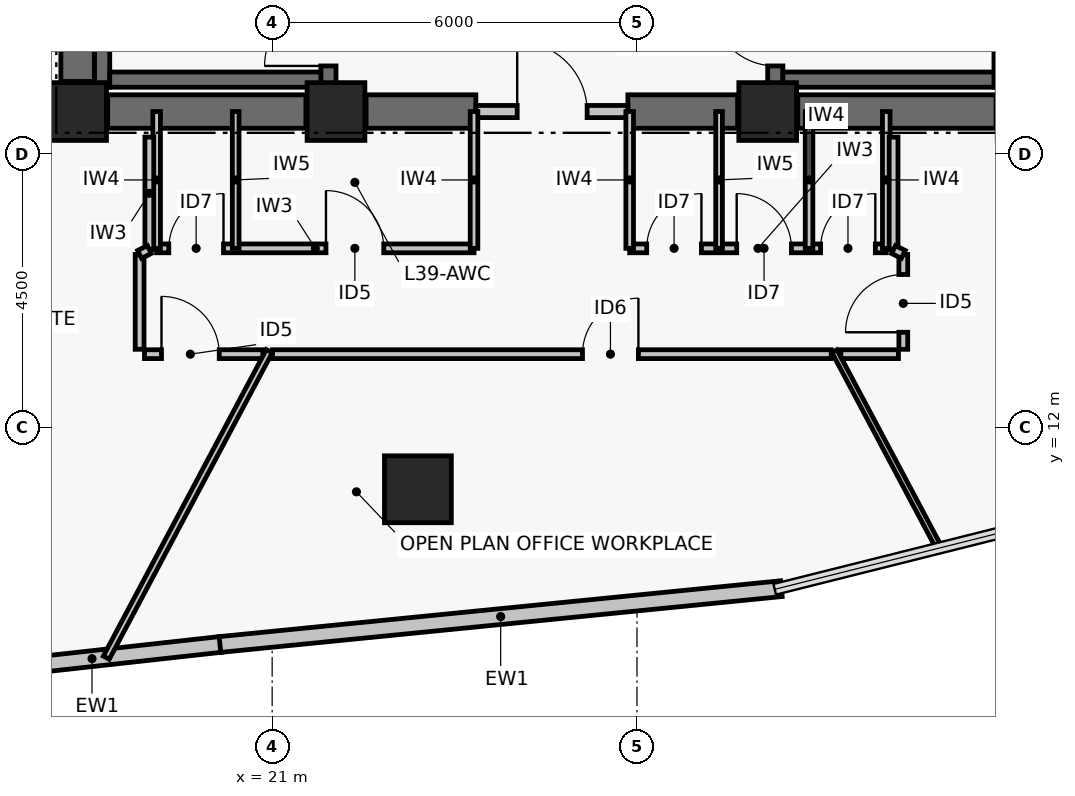
"""IFC4 building model, lengths in metres.
Left out: names, types, materials, properties, quantities, classifications, styles, units other than length and angle.
Written with IfcOpenShell. Run it as: python <this file> out.ifc"""

import sys

from ifc_helpers import new_model, si_unit, direction, frame, frame_2d, origin, origin_2d, place, context, subcontext, project, spatial, rectangle, hollow_rectangle, extrude, element, fill, save


model = new_model("IFC4")
c1 = context("Model", 3, precision=1e-05, world=origin(), true_north=direction((0.0, 1.0)))
c2 = subcontext(c1, "Body", "Model", "MODEL_VIEW")
j1 = project(units=[si_unit("LENGTHUNIT", "METRE"), si_unit("PLANEANGLEUNIT", "RADIAN")], contexts=[c1])
p1 = place(None, origin())
s1 = spatial("IfcSite", under=j1, at=p1, CompositionType="ELEMENT")
p2 = place(p1, origin())
s2 = spatial("IfcBuilding", under=s1, at=p2, CompositionType="ELEMENT")
p3 = place(p2, frame((0.0, 0.0, 158.04)))
s3 = spatial("IfcBuildingStorey", under=s2, at=p3, CompositionType="ELEMENT", Elevation=158.04)
for number, where, z_axis, x_axis in (
    (1, (17.8, 17.2, 0.0), (0.0, 0.0, 1.0), (1.0, 0.0, 0.0)),
    (2, (22.05, 17.2, 0.0), (0.0, 0.0, 1.0), (1.0, 0.0, 0.0)),
    (3, (29.15, 17.2, 0.0), (0.0, 0.0, 1.0), (1.0, 0.0, 0.0)),
):
    element("IfcColumn", number, at=place(p3, frame(where, z_axis=z_axis, x_axis=x_axis)), inside=s3, PredefinedType="COLUMN", context=c2, shape_type="SweptSolid", body=[
        extrude(rectangle(XDim=0.95, YDim=0.95, at=origin_2d()), origin(), (0.0, 0.0, 1.0), 3.72),
    ])
p4 = place(p3, frame((18.295, 17.2, 0.0), z_axis=(0.0, 0.0, 1.0), x_axis=(1.0, 0.0, 0.0)))
e4 = element("IfcWall", 4, at=p4, inside=s3, PredefinedType="SHEAR", context=c2, shape_type="SweptSolid", body=[
    extrude(rectangle(XDim=3.26, YDim=0.55, at=frame_2d((1.63, 0.0))), origin(), (0.0, 0.0, 1.0), 3.5),
])
p5 = place(p3, frame((22.545, 17.2, 0.0), z_axis=(0.0, 0.0, 1.0), x_axis=(1.0, 0.0, 0.0)))
e5 = element("IfcWall", 5, at=p5, inside=s3, PredefinedType="SHEAR", context=c2, shape_type="SweptSolid", body=[
    extrude(rectangle(XDim=1.805, YDim=0.55, at=frame_2d((0.903, 0.0))), origin(), (0.0, 0.0, 1.0), 3.5),
])
p6 = place(p3, frame((26.85, 17.2, 0.0), z_axis=(0.0, 0.0, 1.0), x_axis=(1.0, 0.0, 0.0)))
e6 = element("IfcWall", 6, at=p6, inside=s3, PredefinedType="SHEAR", context=c2, shape_type="SweptSolid", body=[
    extrude(rectangle(XDim=1.805, YDim=0.55, at=frame_2d((0.902, 0.0))), origin(), (0.0, 0.0, 1.0), 3.5),
])
p7 = place(p3, frame((29.645, 17.2, 0.0), z_axis=(0.0, 0.0, 1.0), x_axis=(1.0, 0.0, 0.0)))
e7 = element("IfcWall", 7, at=p7, inside=s3, PredefinedType="SHEAR", context=c2, shape_type="SweptSolid", body=[
    extrude(rectangle(XDim=3.26, YDim=0.55, at=frame_2d((1.63, 0.0))), origin(), (0.0, 0.0, 1.0), 3.5),
])
p8 = place(p3, frame((17.8, 17.695, 0.0), z_axis=(0.0, 0.0, 1.0), x_axis=(0.0, 1.0, 0.0)))
e8 = element("IfcWall", 8, at=p8, inside=s3, PredefinedType="SHEAR", context=c2, shape_type="SweptSolid", body=[
    extrude(rectangle(XDim=8.61, YDim=0.55, at=frame_2d((4.305, 0.0))), origin(), (0.0, 0.0, 1.0), 3.5),
])
p9 = place(p3, frame((18.204, 17.6, 0.0), z_axis=(0.0, 0.0, 1.0), x_axis=(0.0, 1.0, 0.0)))
e9 = element("IfcWall", 9, at=p9, inside=s3, PredefinedType="SHEAR", context=c2, shape_type="SweptSolid", body=[
    extrude(rectangle(XDim=8.8, YDim=0.25, at=frame_2d((4.4, 0.0))), origin(), (0.0, 0.0, 1.0), 3.5),
])
p10 = place(p3, frame((21.925, 17.6, 0.0), z_axis=(0.0, 0.0, 1.0), x_axis=(0.0, 1.0, 0.0)))
e10 = element("IfcWall", 10, at=p10, inside=s3, PredefinedType="SHEAR", context=c2, shape_type="SweptSolid", body=[
    extrude(rectangle(XDim=8.8, YDim=0.25, at=frame_2d((4.4, 0.0))), origin(), (0.0, 0.0, 1.0), 3.5),
])
p11 = place(p10, frame((0.35, 0.0, 0.0)))
e11 = element("IfcOpeningElement", 11, at=p11, cuts=e10, PredefinedType="OPENING", context=c2, shape_type="SweptSolid", body=[
    extrude(rectangle(XDim=1.05, YDim=2.08, at=frame_2d((0.525, 1.04))), frame((0.0, 0.135, 0.0), z_axis=(0.0, -1.0, 0.0), x_axis=(1.0, 0.0, 0.0)), (0.0, 0.0, 1.0), 0.27),
])
p12 = place(p3, frame((18.329, 17.725, 0.0), z_axis=(0.0, 0.0, 1.0), x_axis=(1.0, 0.0, 0.0)))
e12 = element("IfcWall", 12, at=p12, inside=s3, PredefinedType="SHEAR", context=c2, shape_type="SweptSolid", body=[
    extrude(rectangle(XDim=3.471, YDim=0.25, at=frame_2d((1.735, 0.0))), origin(), (0.0, 0.0, 1.0), 3.5),
])
p13 = place(p3, frame((29.275, 17.6, 0.0), z_axis=(0.0, 0.0, 1.0), x_axis=(0.0, 1.0, 0.0)))
e13 = element("IfcWall", 13, at=p13, inside=s3, PredefinedType="SHEAR", context=c2, shape_type="SweptSolid", body=[
    extrude(rectangle(XDim=8.8, YDim=0.25, at=frame_2d((4.4, 0.0))), origin(), (0.0, 0.0, 1.0), 3.5),
])
p14 = place(p13, frame((0.35, 0.0, 0.0)))
e14 = element("IfcOpeningElement", 14, at=p14, cuts=e13, PredefinedType="OPENING", context=c2, shape_type="SweptSolid", body=[
    extrude(rectangle(XDim=1.05, YDim=2.08, at=frame_2d((0.525, 1.04))), frame((0.0, 0.135, 0.0), z_axis=(0.0, -1.0, 0.0), x_axis=(1.0, 0.0, 0.0)), (0.0, 0.0, 1.0), 0.27),
])
p15 = place(p3, frame((32.996, 17.6, 0.0), z_axis=(0.0, 0.0, 1.0), x_axis=(0.0, 1.0, 0.0)))
e15 = element("IfcWall", 15, at=p15, inside=s3, PredefinedType="SHEAR", context=c2, shape_type="SweptSolid", body=[
    extrude(rectangle(XDim=8.8, YDim=0.25, at=frame_2d((4.4, 0.0))), origin(), (0.0, 0.0, 1.0), 3.5),
])
p16 = place(p3, frame((29.4, 17.725, 0.0), z_axis=(0.0, 0.0, 1.0), x_axis=(1.0, 0.0, 0.0)))
e16 = element("IfcWall", 16, at=p16, inside=s3, PredefinedType="SHEAR", context=c2, shape_type="SweptSolid", body=[
    extrude(rectangle(XDim=3.471, YDim=0.25, at=frame_2d((1.736, 0.0))), origin(), (0.0, 0.0, 1.0), 3.5),
])
p17 = place(p3, frame((23.397, 10.988, 0.0), z_axis=(0.0, 0.0, 1.0), x_axis=(1.0, 0.0, 0.0)))
e17 = element("IfcColumn", 17, at=p17, inside=s3, PredefinedType="COLUMN", context=c2, shape_type="SweptSolid", body=[
    extrude(hollow_rectangle(XDim=1.1, YDim=1.1, WallThickness=0.045, at=origin_2d()), origin(), (0.0, 0.0, 1.0), 3.72),
])
p18 = place(p3, frame((20.153, 8.437, 0.0), z_axis=(0.0, 0.0, 1.0), x_axis=(-0.993933978819, -0.109978387641, 0.0)))
e18 = element("IfcWall", 18, at=p18, inside=s3, PredefinedType="PARTITIONING", context=c2, shape_type="SweptSolid", body=[
    extrude(rectangle(XDim=4.258, YDim=0.26, at=frame_2d((2.129, 0.0))), origin(), (0.0, 0.0, 1.0), 3.5),
])
p19 = place(p3, frame((29.375, 9.354, 0.0), z_axis=(0.0, 0.0, 1.0), x_axis=(-0.9950896707, -0.098977508888, 0.0)))
e19 = element("IfcWall", 19, at=p19, inside=s3, PredefinedType="PARTITIONING", context=c2, shape_type="SweptSolid", body=[
    extrude(rectangle(XDim=9.28, YDim=0.26, at=frame_2d((4.64, 0.0))), origin(), (0.0, 0.0, 1.0), 3.5),
])
p20 = place(p3, frame((24.35, 17.2, 0.0), z_axis=(0.0, 0.0, 1.0), x_axis=(1.0, 0.0, 0.0)))
e20 = element("IfcWall", 20, at=p20, inside=s3, PredefinedType="PARTITIONING", context=c2, shape_type="SweptSolid", body=[
    extrude(rectangle(XDim=2.5, YDim=0.2, at=frame_2d((1.25, 0.0))), origin(), (0.0, 0.0, 1.0), 2.63),
])
p21 = place(p20, frame((0.68, 0.0, 0.0)))
e21 = element("IfcOpeningElement", 21, at=p21, cuts=e20, PredefinedType="OPENING", context=c2, shape_type="SweptSolid", body=[
    extrude(rectangle(XDim=1.15, YDim=2.08, at=frame_2d((0.575, 1.04))), frame((0.0, 0.11, 0.0), z_axis=(0.0, -1.0, 0.0), x_axis=(1.0, 0.0, 0.0)), (0.0, 0.0, 1.0), 0.22),
])
p22 = place(p3, frame((19.1, 14.95, 0.0), z_axis=(0.0, 0.0, 1.0), x_axis=(1.0, 0.0, 0.0)))
e22 = element("IfcWall", 22, at=p22, inside=s3, PredefinedType="PARTITIONING", context=c2, shape_type="SweptSolid", body=[
    extrude(rectangle(XDim=5.22, YDim=0.145, at=frame_2d((2.61, 0.0))), origin(), (0.0, 0.0, 1.0), 2.73),
])
p23 = place(p22, frame((0.2, 0.0, 0.0)))
e23 = element("IfcOpeningElement", 23, at=p23, cuts=e22, PredefinedType="OPENING", context=c2, shape_type="SweptSolid", body=[
    extrude(rectangle(XDim=0.9, YDim=2.02, at=frame_2d((0.45, 1.01))), frame((0.0, 0.083, 0.0), z_axis=(0.0, -1.0, 0.0), x_axis=(1.0, 0.0, 0.0)), (0.0, 0.0, 1.0), 0.165),
])
p24 = place(p22, frame((2.785, 0.0, 0.0)))
e24 = element("IfcOpeningElement", 24, at=p24, cuts=e22, PredefinedType="OPENING", context=c2, shape_type="SweptSolid", body=[
    extrude(rectangle(XDim=0.95, YDim=2.06, at=frame_2d((0.475, 1.03))), frame((0.0, 0.083, 0.0), z_axis=(0.0, -1.0, 0.0), x_axis=(1.0, 0.0, 0.0)), (0.0, 0.0, 1.0), 0.165),
])
p25 = place(p3, frame((26.88, 14.95, 0.0), z_axis=(0.0, 0.0, 1.0), x_axis=(1.0, 0.0, 0.0)))
e25 = element("IfcWall", 25, at=p25, inside=s3, PredefinedType="PARTITIONING", context=c2, shape_type="SweptSolid", body=[
    extrude(rectangle(XDim=4.22, YDim=0.145, at=frame_2d((2.11, 0.0))), origin(), (0.0, 0.0, 1.0), 2.93),
])
p26 = place(p25, frame((0.28, 0.0, 0.0)))
e26 = element("IfcOpeningElement", 26, at=p26, cuts=e25, PredefinedType="OPENING", context=c2, shape_type="SweptSolid", body=[
    extrude(rectangle(XDim=0.9, YDim=2.02, at=frame_2d((0.45, 1.01))), frame((0.0, 0.083, 0.0), z_axis=(0.0, -1.0, 0.0), x_axis=(1.0, 0.0, 0.0)), (0.0, 0.0, 1.0), 0.165),
])
p27 = place(p25, frame((1.76, 0.0, 0.0)))
e27 = element("IfcOpeningElement", 27, at=p27, cuts=e25, PredefinedType="OPENING", context=c2, shape_type="SweptSolid", body=[
    extrude(rectangle(XDim=0.9, YDim=2.02, at=frame_2d((0.45, 1.01))), frame((0.0, 0.083, 0.0), z_axis=(0.0, -1.0, 0.0), x_axis=(1.0, 0.0, 0.0)), (0.0, 0.0, 1.0), 0.165),
])
p28 = place(p25, frame((3.14, 0.0, 0.0)))
e28 = element("IfcOpeningElement", 28, at=p28, cuts=e25, PredefinedType="OPENING", context=c2, shape_type="SweptSolid", body=[
    extrude(rectangle(XDim=0.9, YDim=2.02, at=frame_2d((0.45, 1.01))), frame((0.0, 0.083, 0.0), z_axis=(0.0, -1.0, 0.0), x_axis=(1.0, 0.0, 0.0)), (0.0, 0.0, 1.0), 0.165),
])
p29 = place(p3, frame((19.1, 14.95, 0.0), z_axis=(0.0, 0.0, 1.0), x_axis=(0.0, 1.0, 0.0)))
e29 = element("IfcWall", 29, at=p29, inside=s3, PredefinedType="PARTITIONING", context=c2, shape_type="SweptSolid", body=[
    extrude(rectangle(XDim=2.25, YDim=0.125, at=frame_2d((1.125, 0.0))), origin(), (0.0, 0.0, 1.0), 2.63),
])
p30 = place(p3, frame((20.4, 14.95, 0.0), z_axis=(0.0, 0.0, 1.0), x_axis=(0.0, 1.0, 0.0)))
e30 = element("IfcWall", 30, at=p30, inside=s3, PredefinedType="PARTITIONING", context=c2, shape_type="SweptSolid", body=[
    extrude(rectangle(XDim=2.25, YDim=0.11, at=frame_2d((1.125, 0.0))), origin(), (0.0, 0.0, 1.0), 2.63),
])
for number, where, z_axis, x_axis in (
    (31, (24.32, 14.95, 0.0), (0.0, 0.0, 1.0), (0.0, 1.0, 0.0)),
    (32, (26.88, 14.95, 0.0), (0.0, 0.0, 1.0), (0.0, 1.0, 0.0)),
):
    element("IfcWall", number, at=place(p3, frame(where, z_axis=z_axis, x_axis=x_axis)), inside=s3, PredefinedType="PARTITIONING", context=c2, shape_type="SweptSolid", body=[
        extrude(rectangle(XDim=2.25, YDim=0.125, at=frame_2d((1.125, 0.0))), origin(), (0.0, 0.0, 1.0), 2.63),
    ])
p31 = place(p3, frame((28.35, 14.95, 0.0), z_axis=(0.0, 0.0, 1.0), x_axis=(0.0, 1.0, 0.0)))
e33 = element("IfcWall", 33, at=p31, inside=s3, PredefinedType="PARTITIONING", context=c2, shape_type="SweptSolid", body=[
    extrude(rectangle(XDim=2.25, YDim=0.11, at=frame_2d((1.125, 0.0))), origin(), (0.0, 0.0, 1.0), 2.63),
])
for number, where, z_axis, x_axis in (
    (34, (29.83, 14.95, 0.0), (0.0, 0.0, 1.0), (0.0, 1.0, 0.0)),
    (35, (31.1, 14.95, 0.0), (0.0, 0.0, 1.0), (0.0, 1.0, 0.0)),
):
    element("IfcWall", number, at=place(p3, frame(where, z_axis=z_axis, x_axis=x_axis)), inside=s3, PredefinedType="PARTITIONING", context=c2, shape_type="SweptSolid", body=[
        extrude(rectangle(XDim=2.25, YDim=0.125, at=frame_2d((1.125, 0.0))), origin(), (0.0, 0.0, 1.0), 2.63),
    ])
p32 = place(p3, frame((18.98, 16.78, 0.0), z_axis=(0.0, 0.0, 1.0), x_axis=(0.0, -1.0, 0.0)))
e36 = element("IfcWall", 36, at=p32, inside=s3, PredefinedType="PARTITIONING", context=c2, shape_type="SweptSolid", body=[
    extrude(rectangle(XDim=1.85, YDim=0.145, at=frame_2d((0.925, 0.0))), origin(), (0.0, 0.0, 1.0), 2.63),
])
p33 = place(p3, frame((18.82, 14.85, 0.0), z_axis=(0.0, 0.0, 1.0), x_axis=(0.0, -1.0, 0.0)))
e37 = element("IfcWall", 37, at=p33, inside=s3, PredefinedType="PARTITIONING", context=c2, shape_type="SweptSolid", body=[
    extrude(rectangle(XDim=1.56, YDim=0.145, at=frame_2d((0.78, 0.0))), origin(), (0.0, 0.0, 1.0), 3.08),
])
p34 = place(p3, frame((18.9, 13.21, 0.0), z_axis=(0.0, 0.0, 1.0), x_axis=(1.0, 0.0, 0.0)))
e38 = element("IfcWall", 38, at=p34, inside=s3, PredefinedType="PARTITIONING", context=c2, shape_type="SweptSolid", body=[
    extrude(rectangle(XDim=1.947, YDim=0.145, at=frame_2d((0.974, 0.0))), origin(), (0.0, 0.0, 1.0), 3.08),
])
p35 = place(p34, frame((0.28, 0.0, 0.0)))
e39 = element("IfcOpeningElement", 39, at=p35, cuts=e38, PredefinedType="OPENING", context=c2, shape_type="SweptSolid", body=[
    extrude(rectangle(XDim=0.95, YDim=2.06, at=frame_2d((0.475, 1.03))), frame((0.0, 0.083, 0.0), z_axis=(0.0, -1.0, 0.0), x_axis=(1.0, 0.0, 0.0)), (0.0, 0.0, 1.0), 0.165),
])
p36 = place(p3, frame((21.006, 13.21, 0.0), z_axis=(0.0, 0.0, 1.0), x_axis=(1.0, 0.0, 0.0)))
e40 = element("IfcWall", 40, at=p36, inside=s3, PredefinedType="PARTITIONING", context=c2, shape_type="SweptSolid", body=[
    extrude(rectangle(XDim=9.189, YDim=0.145, at=frame_2d((4.594, 0.0))), origin(), (0.0, 0.0, 1.0), 2.73),
])
p37 = place(p36, frame((5.098, 0.0, 0.0)))
e41 = element("IfcOpeningElement", 41, at=p37, cuts=e40, PredefinedType="OPENING", context=c2, shape_type="SweptSolid", body=[
    extrude(rectangle(XDim=0.92, YDim=2.05, at=frame_2d((0.46, 1.025))), frame((0.0, 0.083, 0.0), z_axis=(0.0, -1.0, 0.0), x_axis=(1.0, 0.0, 0.0)), (0.0, 0.0, 1.0), 0.165),
])
p38 = place(p3, frame((30.353, 13.21, 0.0), z_axis=(0.0, 0.0, 1.0), x_axis=(1.0, 0.0, 0.0)))
e42 = element("IfcWall", 42, at=p38, inside=s3, PredefinedType="PARTITIONING", context=c2, shape_type="SweptSolid", body=[
    extrude(rectangle(XDim=0.947, YDim=0.145, at=frame_2d((0.474, 0.0))), origin(), (0.0, 0.0, 1.0), 3.5),
])
p39 = place(p3, frame((31.38, 13.29, 0.0), z_axis=(0.0, 0.0, 1.0), x_axis=(0.0, 1.0, 0.0)))
e43 = element("IfcWall", 43, at=p39, inside=s3, PredefinedType="PARTITIONING", context=c2, shape_type="SweptSolid", body=[
    extrude(rectangle(XDim=1.56, YDim=0.145, at=frame_2d((0.78, 0.0))), origin(), (0.0, 0.0, 1.0), 3.5),
])
p40 = place(p39, frame((0.28, 0.0, 0.0)))
e44 = element("IfcOpeningElement", 44, at=p40, cuts=e43, PredefinedType="OPENING", context=c2, shape_type="SweptSolid", body=[
    extrude(rectangle(XDim=0.95, YDim=2.06, at=frame_2d((0.475, 1.03))), frame((0.0, 0.083, 0.0), z_axis=(0.0, -1.0, 0.0), x_axis=(1.0, 0.0, 0.0)), (0.0, 0.0, 1.0), 0.165),
])
p41 = place(p3, frame((31.22, 14.93, 0.0), z_axis=(0.0, 0.0, 1.0), x_axis=(0.0, 1.0, 0.0)))
e45 = element("IfcWall", 45, at=p41, inside=s3, PredefinedType="PARTITIONING", context=c2, shape_type="SweptSolid", body=[
    extrude(rectangle(XDim=1.85, YDim=0.145, at=frame_2d((0.925, 0.0))), origin(), (0.0, 0.0, 1.0), 2.63),
])
p42 = place(p3, frame((20.953, 13.26, 0.0), z_axis=(0.0, 0.0, 1.0), x_axis=(-0.469478237377, -0.882944043883, 0.0)))
e46 = element("IfcWall", 46, at=p42, inside=s3, PredefinedType="PARTITIONING", context=c2, shape_type="SweptSolid", body=[
    extrude(rectangle(XDim=5.71, YDim=0.11, at=frame_2d((2.855, 0.0))), origin(), (0.0, 0.0, 1.0), 2.93),
])
p43 = place(p3, frame((30.247, 13.26, 0.0), z_axis=(0.0, 0.0, 1.0), x_axis=(0.469475406562, -0.882945549076, 0.0)))
e47 = element("IfcWall", 47, at=p43, inside=s3, PredefinedType="PARTITIONING", context=c2, shape_type="SweptSolid", body=[
    extrude(rectangle(XDim=3.679, YDim=0.095, at=frame_2d((1.84, 0.0))), origin(), (0.0, 0.0, 1.0), 3.5),
])
for number, where, z_axis, x_axis in (
    (48, (18.82, 14.85, 0.0), (0.0, 0.0, 1.0), (0.895, 0.447, 0.0)),
    (49, (31.38, 14.85, 0.0), (0.0, 0.0, 1.0), (-0.895, 0.447, 0.0)),
):
    element("IfcWall", number, at=place(p3, frame(where, z_axis=z_axis, x_axis=x_axis)), inside=s3, PredefinedType="PARTITIONING", context=c2, shape_type="SweptSolid", body=[
        extrude(rectangle(XDim=0.179, YDim=0.145, at=frame_2d((0.089, 0.0))), origin(), (0.0, 0.0, 1.0), 3.5),
    ])
p44 = place(p11, origin())
e50 = element("IfcDoor", 50, at=p44, inside=s3, OperationType="SINGLE_SWING_LEFT", PredefinedType="DOOR", context=c2, shape_type="SweptSolid", body=[
    extrude(rectangle(XDim=1.05, YDim=2.08, at=frame_2d((0.525, 1.04))), frame((0.0, 0.025, 0.0), z_axis=(0.0, -1.0, 0.0), x_axis=(1.0, 0.0, 0.0)), (0.0, 0.0, 1.0), 0.05),
])
fill(e11, e50)
p45 = place(p14, origin())
e51 = element("IfcDoor", 51, at=p45, inside=s3, OperationType="SINGLE_SWING_RIGHT", PredefinedType="DOOR", context=c2, shape_type="SweptSolid", body=[
    extrude(rectangle(XDim=1.05, YDim=2.08, at=frame_2d((0.525, 1.04))), frame((0.0, 0.025, 0.0), z_axis=(0.0, -1.0, 0.0), x_axis=(1.0, 0.0, 0.0)), (0.0, 0.0, 1.0), 0.05),
])
fill(e14, e51)
p46 = place(p21, origin())
e52 = element("IfcDoor", 52, at=p46, inside=s3, OperationType="SINGLE_SWING_LEFT", PredefinedType="DOOR", context=c2, shape_type="SweptSolid", body=[
    extrude(rectangle(XDim=1.15, YDim=2.08, at=frame_2d((0.575, 1.04))), frame((0.0, 0.025, 0.0), z_axis=(0.0, -1.0, 0.0), x_axis=(1.0, 0.0, 0.0)), (0.0, 0.0, 1.0), 0.05),
])
fill(e21, e52)
p47 = place(p23, origin())
e53 = element("IfcDoor", 53, at=p47, inside=s3, OperationType="SINGLE_SWING_RIGHT", PredefinedType="DOOR", context=c2, shape_type="SweptSolid", body=[
    extrude(rectangle(XDim=0.9, YDim=2.02, at=frame_2d((0.45, 1.01))), frame((0.0, 0.025, 0.0), z_axis=(0.0, -1.0, 0.0), x_axis=(1.0, 0.0, 0.0)), (0.0, 0.0, 1.0), 0.05),
])
fill(e23, e53)
p48 = place(p24, origin())
e54 = element("IfcDoor", 54, at=p48, inside=s3, OperationType="SINGLE_SWING_LEFT", PredefinedType="DOOR", context=c2, shape_type="SweptSolid", body=[
    extrude(rectangle(XDim=0.95, YDim=2.06, at=frame_2d((0.475, 1.03))), frame((0.0, 0.025, 0.0), z_axis=(0.0, -1.0, 0.0), x_axis=(1.0, 0.0, 0.0)), (0.0, 0.0, 1.0), 0.05),
])
fill(e24, e54)
p49 = place(p26, origin())
e55 = element("IfcDoor", 55, at=p49, inside=s3, OperationType="SINGLE_SWING_RIGHT", PredefinedType="DOOR", context=c2, shape_type="SweptSolid", body=[
    extrude(rectangle(XDim=0.9, YDim=2.02, at=frame_2d((0.45, 1.01))), frame((0.0, 0.025, 0.0), z_axis=(0.0, -1.0, 0.0), x_axis=(1.0, 0.0, 0.0)), (0.0, 0.0, 1.0), 0.05),
])
fill(e26, e55)
p50 = place(p27, origin())
e56 = element("IfcDoor", 56, at=p50, inside=s3, OperationType="SINGLE_SWING_LEFT", PredefinedType="DOOR", context=c2, shape_type="SweptSolid", body=[
    extrude(rectangle(XDim=0.9, YDim=2.02, at=frame_2d((0.45, 1.01))), frame((0.0, 0.025, 0.0), z_axis=(0.0, -1.0, 0.0), x_axis=(1.0, 0.0, 0.0)), (0.0, 0.0, 1.0), 0.05),
])
fill(e27, e56)
p51 = place(p28, origin())
e57 = element("IfcDoor", 57, at=p51, inside=s3, OperationType="SINGLE_SWING_RIGHT", PredefinedType="DOOR", context=c2, shape_type="SweptSolid", body=[
    extrude(rectangle(XDim=0.9, YDim=2.02, at=frame_2d((0.45, 1.01))), frame((0.0, 0.025, 0.0), z_axis=(0.0, -1.0, 0.0), x_axis=(1.0, 0.0, 0.0)), (0.0, 0.0, 1.0), 0.05),
])
fill(e28, e57)
p52 = place(p35, origin())
e58 = element("IfcDoor", 58, at=p52, inside=s3, OperationType="SINGLE_SWING_LEFT", PredefinedType="DOOR", context=c2, shape_type="SweptSolid", body=[
    extrude(rectangle(XDim=0.95, YDim=2.06, at=frame_2d((0.475, 1.03))), frame((0.0, 0.025, 0.0), z_axis=(0.0, -1.0, 0.0), x_axis=(1.0, 0.0, 0.0)), (0.0, 0.0, 1.0), 0.05),
])
fill(e39, e58)
p53 = place(p37, origin())
e59 = element("IfcDoor", 59, at=p53, inside=s3, OperationType="SINGLE_SWING_RIGHT", PredefinedType="DOOR", context=c2, shape_type="SweptSolid", body=[
    extrude(rectangle(XDim=0.92, YDim=2.05, at=frame_2d((0.46, 1.025))), frame((0.0, 0.025, 0.0), z_axis=(0.0, -1.0, 0.0), x_axis=(1.0, 0.0, 0.0)), (0.0, 0.0, 1.0), 0.05),
])
fill(e41, e59)
p54 = place(p40, origin())
e60 = element("IfcDoor", 60, at=p54, inside=s3, OperationType="SINGLE_SWING_LEFT", PredefinedType="DOOR", context=c2, shape_type="SweptSolid", body=[
    extrude(rectangle(XDim=0.95, YDim=2.06, at=frame_2d((0.475, 1.03))), frame((0.0, 0.025, 0.0), z_axis=(0.0, -1.0, 0.0), x_axis=(1.0, 0.0, 0.0)), (0.0, 0.0, 1.0), 0.05),
])
fill(e44, e60)
save(model, sys.argv[1])
